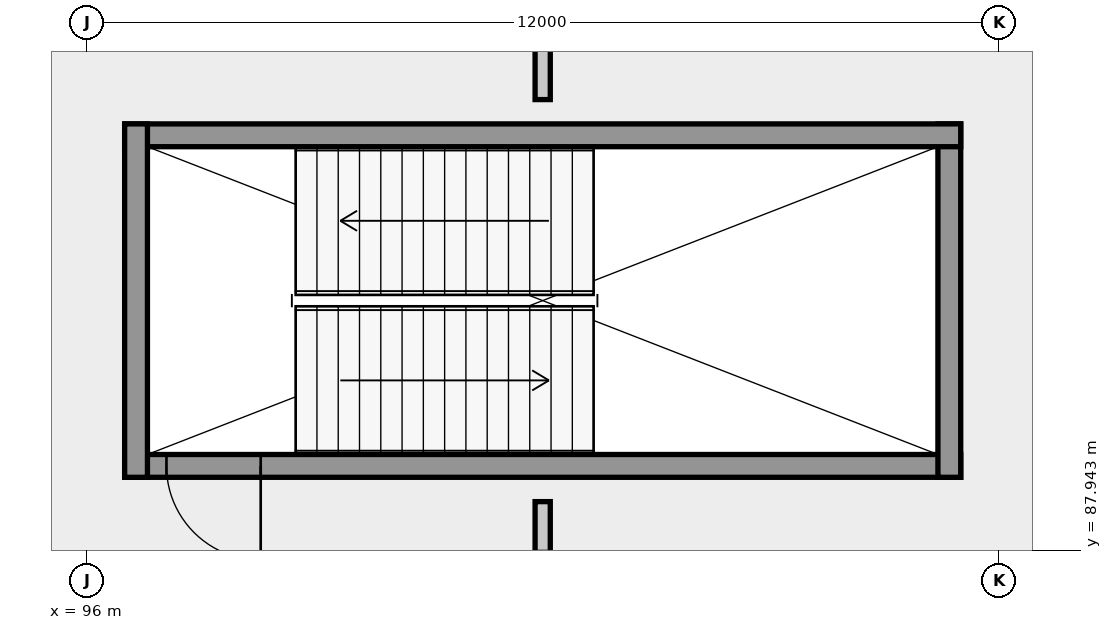
"""IFC4 building model, lengths in metres.
Left out: names, types, materials, properties, quantities, classifications, styles, units other than length and angle.
Written with IfcOpenShell. Run it as: python <this file> out.ifc"""

import sys

from ifc_helpers import new_model, si_unit, direction, frame, frame_2d, origin, place, context, subcontext, project, spatial, rectangle, extrude, element, fill, save


model = new_model("IFC4")
c1 = context("Model", 3, precision=1e-05, world=origin(), true_north=direction((0.0, 1.0)))
c2 = subcontext(c1, "Body", "Model", "MODEL_VIEW")
j1 = project(units=[si_unit("LENGTHUNIT", "METRE"), si_unit("PLANEANGLEUNIT", "RADIAN")], contexts=[c1])
p1 = place(None, origin())
s1 = spatial("IfcSite", under=j1, at=p1, CompositionType="ELEMENT")
p2 = place(p1, origin())
s2 = spatial("IfcBuilding", under=s1, at=p2, CompositionType="ELEMENT")
p3 = place(p2, origin())
s3 = spatial("IfcBuildingStorey", under=s2, at=p3, CompositionType="ELEMENT", Elevation=0.0)
p4 = place(p3, frame((96.5, 89.05, 0.0), z_axis=(0.0, 0.0, 1.0), x_axis=(1.0, 0.0, 0.0)))
e1 = element("IfcWall", 1, at=p4, inside=s3, PredefinedType="SHEAR", context=c2, shape_type="SweptSolid", body=[
    extrude(rectangle(XDim=11.0, YDim=0.3, at=frame_2d((5.5, 0.0))), origin(), (0.0, 0.0, 1.0), 5.14),
])
p5 = place(p4, frame((0.55, 0.0, 0.0)))
e2 = element("IfcOpeningElement", 2, at=p5, cuts=e1, PredefinedType="OPENING", context=c2, shape_type="SweptSolid", body=[
    extrude(rectangle(XDim=1.24, YDim=2.25, at=frame_2d((0.62, 1.125))), frame((0.0, 0.16, 0.0), z_axis=(0.0, -1.0, 0.0), x_axis=(1.0, 0.0, 0.0)), (0.0, 0.0, 1.0), 0.32),
])
p6 = place(p3, frame((107.35, 88.9, 0.0), z_axis=(0.0, 0.0, 1.0), x_axis=(0.0, 1.0, 0.0)))
e3 = element("IfcWall", 3, at=p6, inside=s3, PredefinedType="SHEAR", context=c2, shape_type="SweptSolid", body=[
    extrude(rectangle(XDim=4.65, YDim=0.3, at=frame_2d((2.325, 0.0))), origin(), (0.0, 0.0, 1.0), 5.14),
])
p7 = place(p3, frame((107.5, 93.4, 0.0), z_axis=(0.0, 0.0, 1.0), x_axis=(-1.0, 0.0, 0.0)))
e4 = element("IfcWall", 4, at=p7, inside=s3, PredefinedType="SHEAR", context=c2, shape_type="SweptSolid", body=[
    extrude(rectangle(XDim=11.0, YDim=0.3, at=frame_2d((5.5, 0.0))), origin(), (0.0, 0.0, 1.0), 5.14),
])
p8 = place(p3, frame((96.65, 93.55, 0.0), z_axis=(0.0, 0.0, 1.0), x_axis=(0.0, -1.0, 0.0)))
e5 = element("IfcWall", 5, at=p8, inside=s3, PredefinedType="SHEAR", context=c2, shape_type="SweptSolid", body=[
    extrude(rectangle(XDim=4.65, YDim=0.3, at=frame_2d((2.325, 0.0))), origin(), (0.0, 0.0, 1.0), 5.14),
])
p9 = place(p3, frame((102.0, 84.37, 0.0), z_axis=(0.0, 0.0, 1.0), x_axis=(0.0, 1.0, 0.0)))
e6 = element("IfcWall", 6, at=p9, inside=s3, PredefinedType="PARTITIONING", context=c2, shape_type="SweptSolid", body=[
    extrude(rectangle(XDim=4.21, YDim=0.2, at=frame_2d((2.105, 0.0))), origin(), (0.0, 0.0, 1.0), 5.12),
])
p10 = place(p9, frame((1.91, 0.0, 0.0)))
e7 = element("IfcOpeningElement", 7, at=p10, cuts=e6, PredefinedType="OPENING", context=c2, shape_type="SweptSolid", body=[
    extrude(rectangle(XDim=1.65, YDim=2.35, at=frame_2d((0.825, 1.175))), frame((0.0, 0.11, 0.0), z_axis=(0.0, -1.0, 0.0), x_axis=(1.0, 0.0, 0.0)), (0.0, 0.0, 1.0), 0.22),
])
p11 = place(p3, frame((102.0, 93.87, 0.0), z_axis=(0.0, 0.0, 1.0), x_axis=(0.0, 1.0, 0.0)))
e8 = element("IfcWall", 8, at=p11, inside=s3, PredefinedType="PARTITIONING", context=c2, shape_type="SweptSolid", body=[
    extrude(rectangle(XDim=1.76, YDim=0.2, at=frame_2d((0.88, 0.0))), origin(), (0.0, 0.0, 1.0), 5.12),
])
p12 = place(p5, frame((1.24, 0.0, 0.0), z_axis=(0.0, 0.0, 1.0), x_axis=(-1.0, 0.0, 0.0)))
e9 = element("IfcDoor", 9, at=p12, inside=s3, OperationType="SINGLE_SWING_RIGHT", PredefinedType="DOOR", context=c2, shape_type="SweptSolid", body=[
    extrude(rectangle(XDim=1.24, YDim=2.25, at=frame_2d((0.62, 1.125))), frame((0.0, 0.025, 0.0), z_axis=(0.0, -1.0, 0.0), x_axis=(1.0, 0.0, 0.0)), (0.0, 0.0, 1.0), 0.05),
])
fill(e2, e9)
save(model, sys.argv[1])
